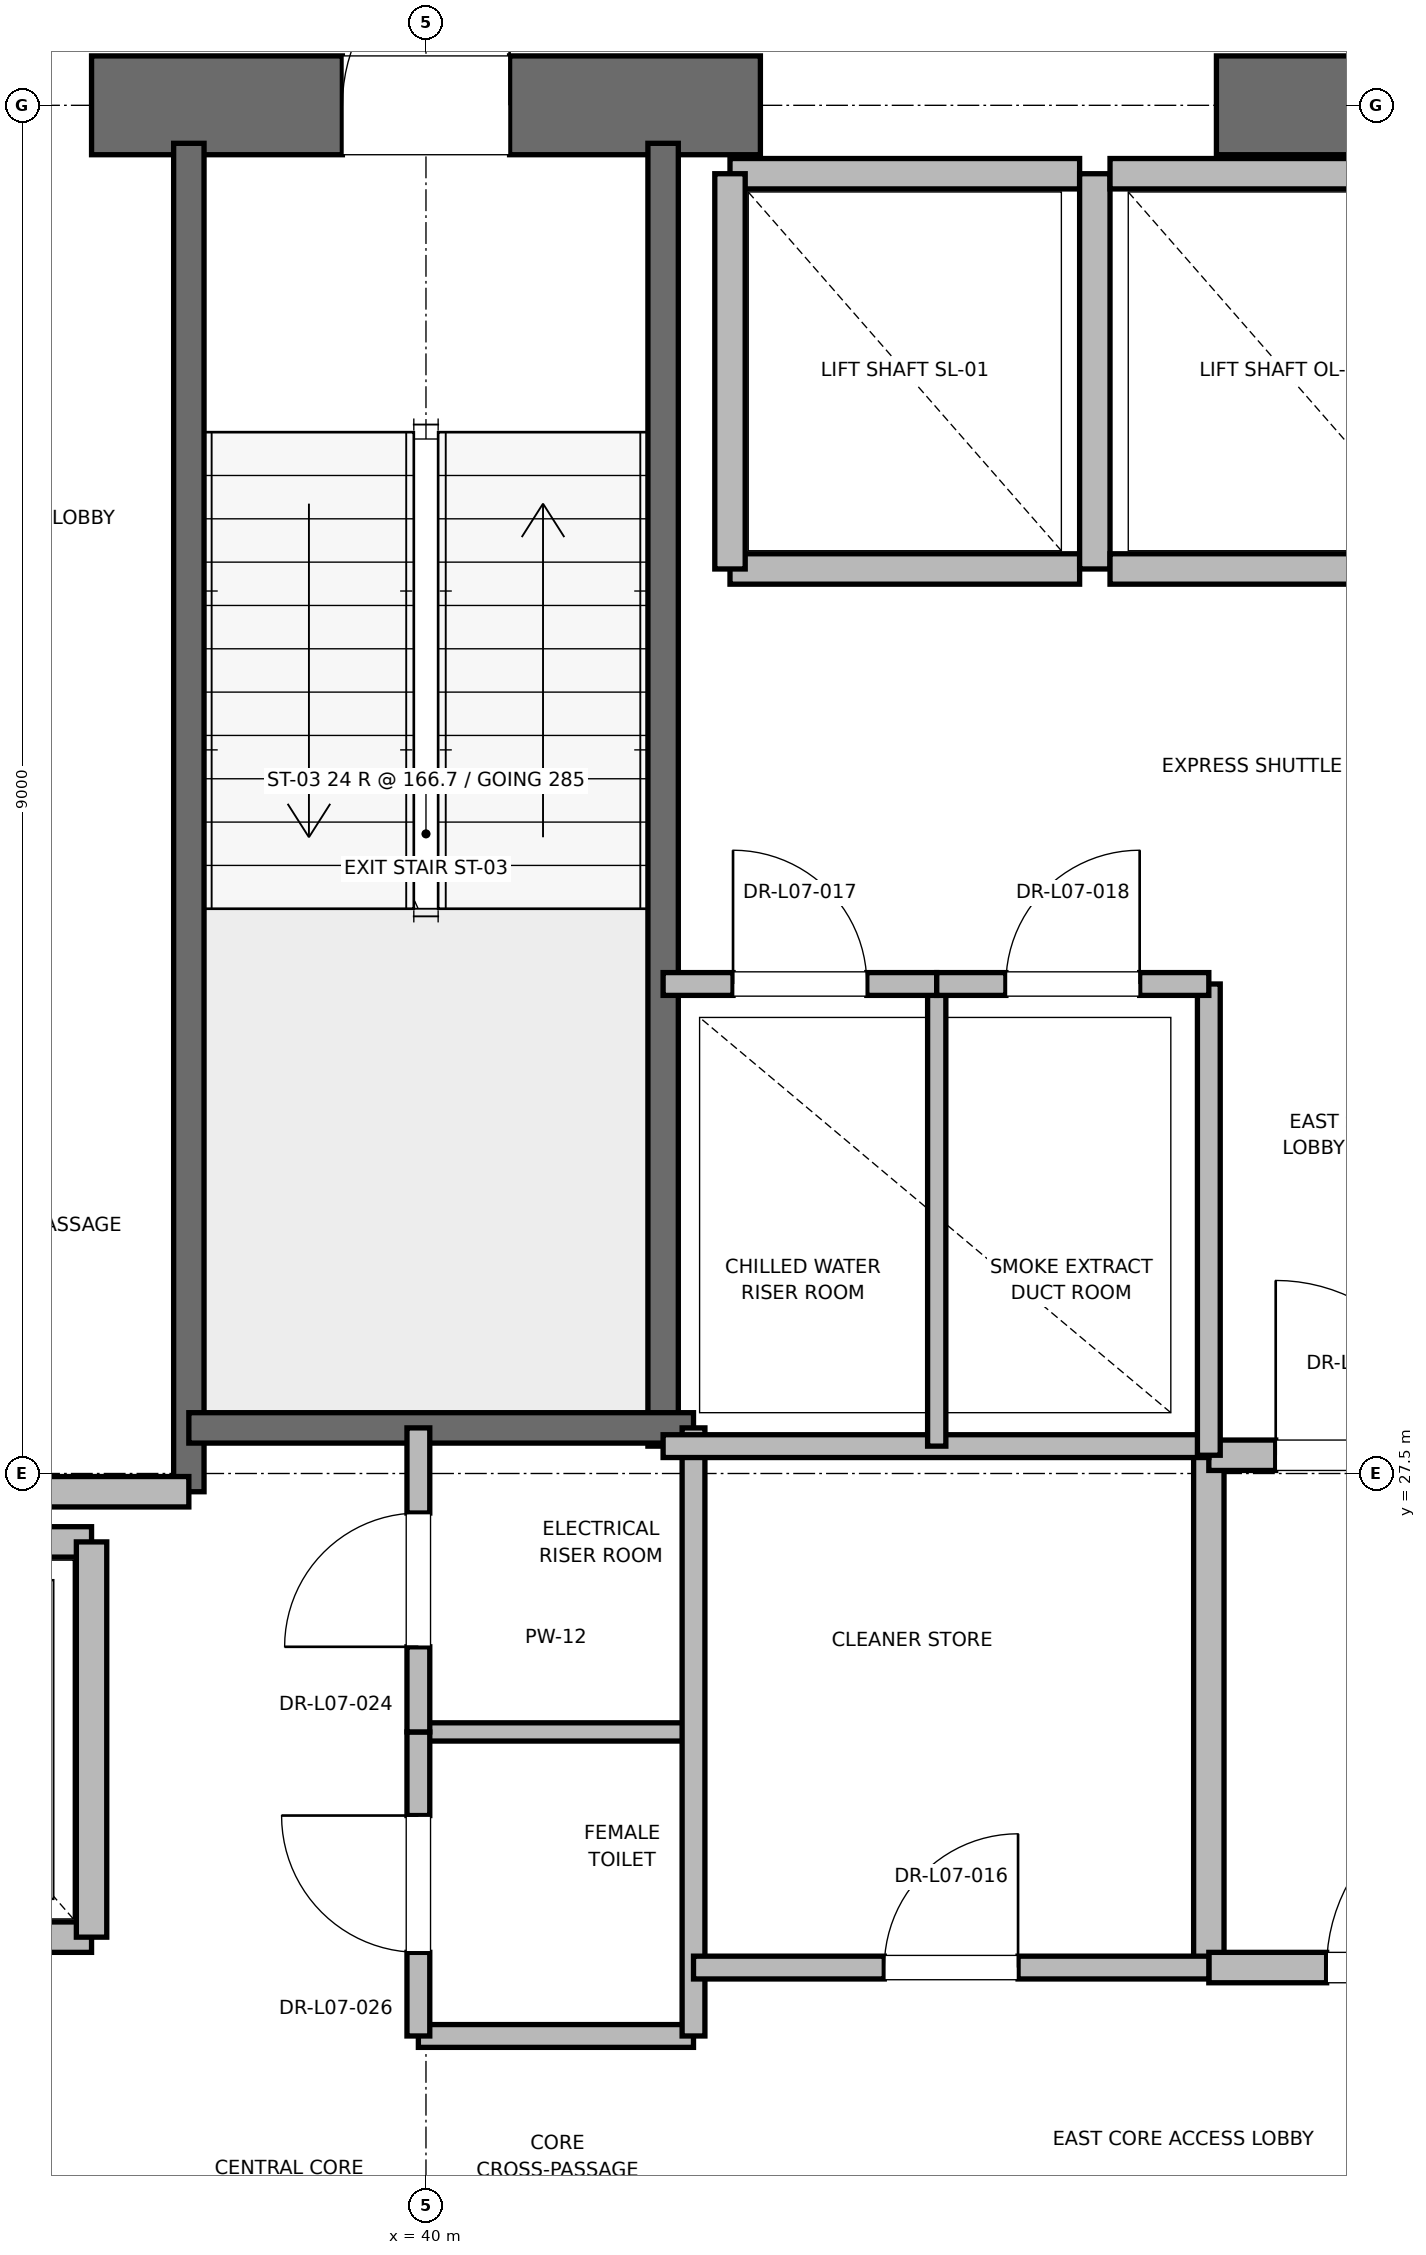
"""IFC4 building model, lengths in metres.
Left out: names, types, materials, properties, quantities, classifications, styles, units other than length and angle.
Written with IfcOpenShell. Run it as: python <this file> out.ifc"""

import sys

from ifc_helpers import new_model, si_unit, direction, frame, frame_2d, origin, place, context, subcontext, project, spatial, rectangle, extrude, element, fill, save


model = new_model("IFC4")
c1 = context("Model", 3, precision=1e-05, world=origin(), true_north=direction((0.0, 1.0)))
c2 = subcontext(c1, "Body", "Model", "MODEL_VIEW")
j1 = project(units=[si_unit("LENGTHUNIT", "METRE"), si_unit("PLANEANGLEUNIT", "RADIAN")], contexts=[c1])
p1 = place(None, origin())
s1 = spatial("IfcSite", under=j1, at=p1, CompositionType="ELEMENT")
p2 = place(p1, origin())
s2 = spatial("IfcBuilding", under=s1, at=p2, CompositionType="ELEMENT")
p3 = place(p2, frame((0.0, 0.0, 35.6)))
s3 = spatial("IfcBuildingStorey", under=s2, at=p3, CompositionType="ELEMENT", Elevation=35.6)
p4 = place(p3, frame((37.8, 36.5, 0.0), z_axis=(0.0, 0.0, 1.0), x_axis=(1.0, 0.0, 0.0)))
e1 = element("IfcWall", 1, at=p4, inside=s3, PredefinedType="SHEAR", context=c2, shape_type="SweptSolid", body=[
    extrude(rectangle(XDim=4.4, YDim=0.65, at=frame_2d((2.2, 0.0))), origin(), (0.0, 0.0, 1.0), 3.76),
])
p5 = place(p4, frame((1.65, 0.0, 0.0)))
e2 = element("IfcOpeningElement", 2, at=p5, cuts=e1, PredefinedType="OPENING", context=c2, shape_type="SweptSolid", body=[
    extrude(rectangle(XDim=1.1, YDim=2.15, at=frame_2d((0.55, 1.075))), frame((0.0, 0.325, 0.0), z_axis=(0.0, -1.0, 0.0), x_axis=(1.0, 0.0, 0.0)), (0.0, 0.0, 1.0), 0.65),
])
p6 = place(p3, frame((45.2, 36.5, 0.0), z_axis=(0.0, 0.0, 1.0), x_axis=(1.0, 0.0, 0.0)))
e3 = element("IfcWall", 3, at=p6, inside=s3, PredefinedType="SHEAR", context=c2, shape_type="SweptSolid", body=[
    extrude(rectangle(XDim=5.8, YDim=0.65, at=frame_2d((2.9, 0.0))), origin(), (0.0, 0.0, 1.0), 3.76),
])
p7 = place(p3, frame((38.44, 27.38, 0.0), z_axis=(0.0, 0.0, 1.0), x_axis=(0.0, 1.0, 0.0)))
e4 = element("IfcWall", 4, at=p7, inside=s3, PredefinedType="SOLIDWALL", context=c2, shape_type="SweptSolid", body=[
    extrude(rectangle(XDim=8.87, YDim=0.2, at=frame_2d((4.435, 0.0))), origin(), (0.0, 0.0, 1.0), 3.76),
])
p8 = place(p3, frame((41.56, 27.68, 0.0), z_axis=(0.0, 0.0, 1.0), x_axis=(0.0, 1.0, 0.0)))
e5 = element("IfcWall", 5, at=p8, inside=s3, PredefinedType="SOLIDWALL", context=c2, shape_type="SweptSolid", body=[
    extrude(rectangle(XDim=8.57, YDim=0.2, at=frame_2d((4.285, 0.0))), origin(), (0.0, 0.0, 1.0), 3.76),
])
p9 = place(p3, frame((38.44, 27.8, 0.0), z_axis=(0.0, 0.0, 1.0), x_axis=(1.0, 0.0, 0.0)))
e6 = element("IfcWall", 6, at=p9, inside=s3, PredefinedType="SOLIDWALL", context=c2, shape_type="SweptSolid", body=[
    extrude(rectangle(XDim=3.32, YDim=0.2, at=frame_2d((1.66, 0.0))), origin(), (0.0, 0.0, 1.0), 3.76),
])
p10 = place(p3, frame((32.82, 27.38, 0.0), z_axis=(0.0, 0.0, 1.0), x_axis=(1.0, 0.0, 0.0)))
e7 = element("IfcWall", 7, at=p10, inside=s3, PredefinedType="PARTITIONING", context=c2, shape_type="SweptSolid", body=[
    extrude(rectangle(XDim=5.62, YDim=0.2, at=frame_2d((2.81, 0.0))), origin(), (0.0, 0.0, 1.0), 3.76),
])
p11 = place(p3, frame((45.15, 24.25, 0.0), z_axis=(0.0, 0.0, 1.0), x_axis=(0.0, 1.0, 0.0)))
e8 = element("IfcWall", 8, at=p11, inside=s3, PredefinedType="PARTITIONING", context=c2, shape_type="SweptSolid", body=[
    extrude(rectangle(XDim=3.37, YDim=0.2, at=frame_2d((1.685, 0.0))), origin(), (0.0, 0.0, 1.0), 3.76),
])
p12 = place(p3, frame((45.15, 24.25, 0.0), z_axis=(0.0, 0.0, 1.0), x_axis=(1.0, 0.0, 0.0)))
e9 = element("IfcWall", 9, at=p12, inside=s3, PredefinedType="PARTITIONING", context=c2, shape_type="SweptSolid", body=[
    extrude(rectangle(XDim=2.7, YDim=0.2, at=frame_2d((1.35, 0.0))), origin(), (0.0, 0.0, 1.0), 3.76),
])
p13 = place(p12, frame((0.775, 0.0, 0.0)))
e10 = element("IfcOpeningElement", 10, at=p13, cuts=e9, PredefinedType="OPENING", context=c2, shape_type="SweptSolid", body=[
    extrude(rectangle(XDim=1.15, YDim=2.2, at=frame_2d((0.575, 1.1))), frame((0.0, 0.1, 0.0), z_axis=(0.0, -1.0, 0.0), x_axis=(1.0, 0.0, 0.0)), (0.0, 0.0, 1.0), 0.2),
])
p14 = place(p3, frame((45.15, 27.62, 0.0), z_axis=(0.0, 0.0, 1.0), x_axis=(1.0, 0.0, 0.0)))
e11 = element("IfcWall", 11, at=p14, inside=s3, PredefinedType="PARTITIONING", context=c2, shape_type="SweptSolid", body=[
    extrude(rectangle(XDim=2.03, YDim=0.2, at=frame_2d((1.015, 0.0))), origin(), (0.0, 0.0, 1.0), 3.76),
])
p15 = place(p14, frame((0.44, 0.0, 0.0)))
e12 = element("IfcOpeningElement", 12, at=p15, cuts=e11, PredefinedType="OPENING", context=c2, shape_type="SweptSolid", body=[
    extrude(rectangle(XDim=1.15, YDim=2.2, at=frame_2d((0.575, 1.1))), frame((0.0, 0.1, 0.0), z_axis=(0.0, -1.0, 0.0), x_axis=(1.0, 0.0, 0.0)), (0.0, 0.0, 1.0), 0.2),
])
p16 = place(p3, frame((35.5, 24.45, 0.0), z_axis=(0.0, 0.0, 1.0), x_axis=(1.0, 0.0, 0.0)))
e13 = element("IfcWall", 13, at=p16, inside=s3, PredefinedType="SOLIDWALL", context=c2, shape_type="SweptSolid", body=[
    extrude(rectangle(XDim=2.3, YDim=0.2, at=frame_2d((1.15, 0.0))), origin(), (0.0, 0.0, 1.0), 3.76),
])
p17 = place(p16, frame((0.6, 0.0, 0.0)))
e14 = element("IfcOpeningElement", 14, at=p17, cuts=e13, PredefinedType="OPENING", context=c2, shape_type="SweptSolid", body=[
    extrude(rectangle(XDim=1.1, YDim=2.2, at=frame_2d((0.55, 1.1))), frame((0.0, 0.1, 0.0), z_axis=(0.0, -1.0, 0.0), x_axis=(1.0, 0.0, 0.0)), (0.0, 0.0, 1.0), 0.2),
])
p18 = place(p3, frame((37.8, 27.05, 0.0), z_axis=(0.0, 0.0, 1.0), x_axis=(-1.0, 0.0, 0.0)))
e15 = element("IfcWall", 15, at=p18, inside=s3, PredefinedType="SOLIDWALL", context=c2, shape_type="SweptSolid", body=[
    extrude(rectangle(XDim=2.3, YDim=0.2, at=frame_2d((1.15, 0.0))), origin(), (0.0, 0.0, 1.0), 3.76),
])
p19 = place(p3, frame((37.8, 24.45, 0.0), z_axis=(0.0, 0.0, 1.0), x_axis=(0.0, 1.0, 0.0)))
e16 = element("IfcWall", 16, at=p19, inside=s3, PredefinedType="SOLIDWALL", context=c2, shape_type="SweptSolid", body=[
    extrude(rectangle(XDim=2.6, YDim=0.2, at=frame_2d((1.3, 0.0))), origin(), (0.0, 0.0, 1.0), 3.76),
])
p20 = place(p3, frame((42.0, 33.45, 0.0), z_axis=(0.0, 0.0, 1.0), x_axis=(1.0, 0.0, 0.0)))
e17 = element("IfcWall", 17, at=p20, inside=s3, PredefinedType="SOLIDWALL", context=c2, shape_type="SweptSolid", body=[
    extrude(rectangle(XDim=2.3, YDim=0.2, at=frame_2d((1.15, 0.0))), origin(), (0.0, 0.0, 1.0), 3.76),
])
p21 = place(p3, frame((44.3, 36.05, 0.0), z_axis=(0.0, 0.0, 1.0), x_axis=(-1.0, 0.0, 0.0)))
e18 = element("IfcWall", 18, at=p21, inside=s3, PredefinedType="SOLIDWALL", context=c2, shape_type="SweptSolid", body=[
    extrude(rectangle(XDim=2.3, YDim=0.2, at=frame_2d((1.15, 0.0))), origin(), (0.0, 0.0, 1.0), 2.54),
])
for number, where, z_axis, x_axis in (
    (19, (42.0, 36.05, 0.0), (0.0, 0.0, 1.0), (0.0, -1.0, 0.0)),
    (20, (44.4, 33.45, 0.0), (0.0, 0.0, 1.0), (0.0, 1.0, 0.0)),
):
    element("IfcWall", number, at=place(p3, frame(where, z_axis=z_axis, x_axis=x_axis)), inside=s3, PredefinedType="SOLIDWALL", context=c2, shape_type="SweptSolid", body=[
        extrude(rectangle(XDim=2.6, YDim=0.2, at=frame_2d((1.3, 0.0))), origin(), (0.0, 0.0, 1.0), 2.54),
    ])
p22 = place(p3, frame((44.5, 33.45, 0.0), z_axis=(0.0, 0.0, 1.0), x_axis=(1.0, 0.0, 0.0)))
e21 = element("IfcWall", 21, at=p22, inside=s3, PredefinedType="SOLIDWALL", context=c2, shape_type="SweptSolid", body=[
    extrude(rectangle(XDim=2.3, YDim=0.2, at=frame_2d((1.15, 0.0))), origin(), (0.0, 0.0, 1.0), 3.76),
])
p23 = place(p3, frame((46.8, 36.05, 0.0), z_axis=(0.0, 0.0, 1.0), x_axis=(-1.0, 0.0, 0.0)))
e22 = element("IfcWall", 22, at=p23, inside=s3, PredefinedType="SOLIDWALL", context=c2, shape_type="SweptSolid", body=[
    extrude(rectangle(XDim=2.3, YDim=0.2, at=frame_2d((1.15, 0.0))), origin(), (0.0, 0.0, 1.0), 2.54),
])
p24 = place(p3, frame((39.95, 23.8, 0.0), z_axis=(0.0, 0.0, 1.0), x_axis=(1.0, 0.0, 0.0)))
e23 = element("IfcWall", 23, at=p24, inside=s3, PredefinedType="PARTITIONING", context=c2, shape_type="SweptSolid", body=[
    extrude(rectangle(XDim=1.81, YDim=0.15, at=frame_2d((0.905, 0.0))), origin(), (0.0, 0.0, 1.0), 2.85),
])
p25 = place(p3, frame((39.95, 25.8, 0.0), z_axis=(0.0, 0.0, 1.0), x_axis=(1.0, 0.0, 0.0)))
e24 = element("IfcWall", 24, at=p25, inside=s3, PredefinedType="PARTITIONING", context=c2, shape_type="SweptSolid", body=[
    extrude(rectangle(XDim=1.81, YDim=0.12, at=frame_2d((0.905, 0.0))), origin(), (0.0, 0.0, 1.0), 2.85),
])
p26 = place(p3, frame((41.76, 23.8, 0.0), z_axis=(0.0, 0.0, 1.0), x_axis=(0.0, 1.0, 0.0)))
e25 = element("IfcWall", 25, at=p26, inside=s3, PredefinedType="PARTITIONING", context=c2, shape_type="SweptSolid", body=[
    extrude(rectangle(XDim=4.0, YDim=0.15, at=frame_2d((2.0, 0.0))), origin(), (0.0, 0.0, 1.0), 2.85),
])
p27 = place(p3, frame((39.95, 23.8, 0.0), z_axis=(0.0, 0.0, 1.0), x_axis=(0.0, 1.0, 0.0)))
e26 = element("IfcWall", 26, at=p27, inside=s3, PredefinedType="PARTITIONING", context=c2, shape_type="SweptSolid", body=[
    extrude(rectangle(XDim=2.0, YDim=0.15, at=frame_2d((1.0, 0.0))), origin(), (0.0, 0.0, 1.0), 2.85),
])
p28 = place(p27, frame((0.55, 0.0, 0.0)))
e27 = element("IfcOpeningElement", 27, at=p28, cuts=e26, PredefinedType="OPENING", context=c2, shape_type="SweptSolid", body=[
    extrude(rectangle(XDim=0.9, YDim=2.1, at=frame_2d((0.45, 1.05))), frame((0.0, 0.075, 0.0), z_axis=(0.0, -1.0, 0.0), x_axis=(1.0, 0.0, 0.0)), (0.0, 0.0, 1.0), 0.15),
])
p29 = place(p3, frame((39.95, 25.8, 0.0), z_axis=(0.0, 0.0, 1.0), x_axis=(0.0, 1.0, 0.0)))
e28 = element("IfcWall", 28, at=p29, inside=s3, PredefinedType="PARTITIONING", context=c2, shape_type="SweptSolid", body=[
    extrude(rectangle(XDim=2.0, YDim=0.15, at=frame_2d((1.0, 0.0))), origin(), (0.0, 0.0, 1.0), 2.85),
])
p30 = place(p29, frame((0.56, 0.0, 0.0)))
e29 = element("IfcOpeningElement", 29, at=p30, cuts=e28, PredefinedType="OPENING", context=c2, shape_type="SweptSolid", body=[
    extrude(rectangle(XDim=0.88, YDim=2.1, at=frame_2d((0.44, 1.05))), frame((0.0, 0.075, 0.0), z_axis=(0.0, -1.0, 0.0), x_axis=(1.0, 0.0, 0.0)), (0.0, 0.0, 1.0), 0.15),
])
p31 = place(p3, frame((41.56, 27.68, 0.0), z_axis=(0.0, 0.0, 1.0), x_axis=(1.0, 0.0, 0.0)))
e30 = element("IfcWall", 30, at=p31, inside=s3, PredefinedType="PARTITIONING", context=c2, shape_type="SweptSolid", body=[
    extrude(rectangle(XDim=3.59, YDim=0.15, at=frame_2d((1.795, 0.0))), origin(), (0.0, 0.0, 1.0), 2.85),
])
p32 = place(p3, frame((41.76, 24.25, 0.0), z_axis=(0.0, 0.0, 1.0), x_axis=(1.0, 0.0, 0.0)))
e31 = element("IfcWall", 31, at=p32, inside=s3, PredefinedType="PARTITIONING", context=c2, shape_type="SweptSolid", body=[
    extrude(rectangle(XDim=3.39, YDim=0.15, at=frame_2d((1.695, 0.0))), origin(), (0.0, 0.0, 1.0), 2.85),
])
p33 = place(p32, frame((1.255, 0.0, 0.0)))
e32 = element("IfcOpeningElement", 32, at=p33, cuts=e31, PredefinedType="OPENING", context=c2, shape_type="SweptSolid", body=[
    extrude(rectangle(XDim=0.88, YDim=2.1, at=frame_2d((0.44, 1.05))), frame((0.0, 0.075, 0.0), z_axis=(0.0, -1.0, 0.0), x_axis=(1.0, 0.0, 0.0)), (0.0, 0.0, 1.0), 0.15),
])
p34 = place(p3, frame((45.15, 27.62, 0.0), z_axis=(0.0, 0.0, 1.0), x_axis=(0.0, 1.0, 0.0)))
e33 = element("IfcWall", 33, at=p34, inside=s3, PredefinedType="PARTITIONING", context=c2, shape_type="SweptSolid", body=[
    extrude(rectangle(XDim=3.1, YDim=0.15, at=frame_2d((1.55, 0.0))), origin(), (0.0, 0.0, 1.0), 2.85),
])
p35 = place(p3, frame((43.36, 27.68, 0.0), z_axis=(0.0, 0.0, 1.0), x_axis=(0.0, 1.0, 0.0)))
e34 = element("IfcWall", 34, at=p35, inside=s3, PredefinedType="PARTITIONING", context=c2, shape_type="SweptSolid", body=[
    extrude(rectangle(XDim=3.04, YDim=0.12, at=frame_2d((1.52, 0.0))), origin(), (0.0, 0.0, 1.0), 2.85),
])
p36 = place(p3, frame((41.56, 30.72, 0.0), z_axis=(0.0, 0.0, 1.0), x_axis=(1.0, 0.0, 0.0)))
e35 = element("IfcWall", 35, at=p36, inside=s3, PredefinedType="PARTITIONING", context=c2, shape_type="SweptSolid", body=[
    extrude(rectangle(XDim=1.8, YDim=0.15, at=frame_2d((0.9, 0.0))), origin(), (0.0, 0.0, 1.0), 2.85),
])
p37 = place(p36, frame((0.46, 0.0, 0.0)))
e36 = element("IfcOpeningElement", 36, at=p37, cuts=e35, PredefinedType="OPENING", context=c2, shape_type="SweptSolid", body=[
    extrude(rectangle(XDim=0.88, YDim=2.1, at=frame_2d((0.44, 1.05))), frame((0.0, 0.075, 0.0), z_axis=(0.0, -1.0, 0.0), x_axis=(1.0, 0.0, 0.0)), (0.0, 0.0, 1.0), 0.15),
])
p38 = place(p3, frame((43.36, 30.72, 0.0), z_axis=(0.0, 0.0, 1.0), x_axis=(1.0, 0.0, 0.0)))
e37 = element("IfcWall", 37, at=p38, inside=s3, PredefinedType="PARTITIONING", context=c2, shape_type="SweptSolid", body=[
    extrude(rectangle(XDim=1.79, YDim=0.15, at=frame_2d((0.895, 0.0))), origin(), (0.0, 0.0, 1.0), 2.85),
])
p39 = place(p38, frame((0.455, 0.0, 0.0)))
e38 = element("IfcOpeningElement", 38, at=p39, cuts=e37, PredefinedType="OPENING", context=c2, shape_type="SweptSolid", body=[
    extrude(rectangle(XDim=0.88, YDim=2.1, at=frame_2d((0.44, 1.05))), frame((0.0, 0.075, 0.0), z_axis=(0.0, -1.0, 0.0), x_axis=(1.0, 0.0, 0.0)), (0.0, 0.0, 1.0), 0.15),
])
p40 = place(p5, origin())
e39 = element("IfcDoor", 39, at=p40, inside=s3, OperationType="SINGLE_SWING_RIGHT", PredefinedType="DOOR", context=c2, shape_type="SweptSolid", body=[
    extrude(rectangle(XDim=1.1, YDim=2.15, at=frame_2d((0.55, 1.075))), frame((0.0, 0.025, 0.0), z_axis=(0.0, -1.0, 0.0), x_axis=(1.0, 0.0, 0.0)), (0.0, 0.0, 1.0), 0.05),
])
fill(e2, e39)
p41 = place(p13, origin())
e40 = element("IfcDoor", 40, at=p41, inside=s3, OperationType="SINGLE_SWING_RIGHT", PredefinedType="DOOR", context=c2, shape_type="SweptSolid", body=[
    extrude(rectangle(XDim=1.15, YDim=2.2, at=frame_2d((0.575, 1.1))), frame((0.0, 0.025, 0.0), z_axis=(0.0, -1.0, 0.0), x_axis=(1.0, 0.0, 0.0)), (0.0, 0.0, 1.0), 0.05),
])
fill(e10, e40)
p42 = place(p15, origin())
e41 = element("IfcDoor", 41, at=p42, inside=s3, OperationType="SINGLE_SWING_LEFT", PredefinedType="DOOR", context=c2, shape_type="SweptSolid", body=[
    extrude(rectangle(XDim=1.15, YDim=2.2, at=frame_2d((0.575, 1.1))), frame((0.0, 0.025, 0.0), z_axis=(0.0, -1.0, 0.0), x_axis=(1.0, 0.0, 0.0)), (0.0, 0.0, 1.0), 0.05),
])
fill(e12, e41)
p43 = place(p28, origin())
e42 = element("IfcDoor", 42, at=p43, inside=s3, OperationType="SINGLE_SWING_RIGHT", PredefinedType="DOOR", context=c2, shape_type="SweptSolid", body=[
    extrude(rectangle(XDim=0.9, YDim=2.1, at=frame_2d((0.45, 1.05))), frame((0.0, 0.025, 0.0), z_axis=(0.0, -1.0, 0.0), x_axis=(1.0, 0.0, 0.0)), (0.0, 0.0, 1.0), 0.05),
])
fill(e27, e42)
p44 = place(p30, origin())
e43 = element("IfcDoor", 43, at=p44, inside=s3, OperationType="SINGLE_SWING_LEFT", PredefinedType="DOOR", context=c2, shape_type="SweptSolid", body=[
    extrude(rectangle(XDim=0.88, YDim=2.1, at=frame_2d((0.44, 1.05))), frame((0.0, 0.025, 0.0), z_axis=(0.0, -1.0, 0.0), x_axis=(1.0, 0.0, 0.0)), (0.0, 0.0, 1.0), 0.05),
])
fill(e29, e43)
p45 = place(p33, origin())
e44 = element("IfcDoor", 44, at=p45, inside=s3, OperationType="SINGLE_SWING_RIGHT", PredefinedType="DOOR", context=c2, shape_type="SweptSolid", body=[
    extrude(rectangle(XDim=0.88, YDim=2.1, at=frame_2d((0.44, 1.05))), frame((0.0, 0.025, 0.0), z_axis=(0.0, -1.0, 0.0), x_axis=(1.0, 0.0, 0.0)), (0.0, 0.0, 1.0), 0.05),
])
fill(e32, e44)
p46 = place(p37, origin())
e45 = element("IfcDoor", 45, at=p46, inside=s3, OperationType="SINGLE_SWING_LEFT", PredefinedType="DOOR", context=c2, shape_type="SweptSolid", body=[
    extrude(rectangle(XDim=0.88, YDim=2.1, at=frame_2d((0.44, 1.05))), frame((0.0, 0.025, 0.0), z_axis=(0.0, -1.0, 0.0), x_axis=(1.0, 0.0, 0.0)), (0.0, 0.0, 1.0), 0.05),
])
fill(e36, e45)
p47 = place(p39, origin())
e46 = element("IfcDoor", 46, at=p47, inside=s3, OperationType="SINGLE_SWING_RIGHT", PredefinedType="DOOR", context=c2, shape_type="SweptSolid", body=[
    extrude(rectangle(XDim=0.88, YDim=2.1, at=frame_2d((0.44, 1.05))), frame((0.0, 0.025, 0.0), z_axis=(0.0, -1.0, 0.0), x_axis=(1.0, 0.0, 0.0)), (0.0, 0.0, 1.0), 0.05),
])
fill(e38, e46)
save(model, sys.argv[1])
